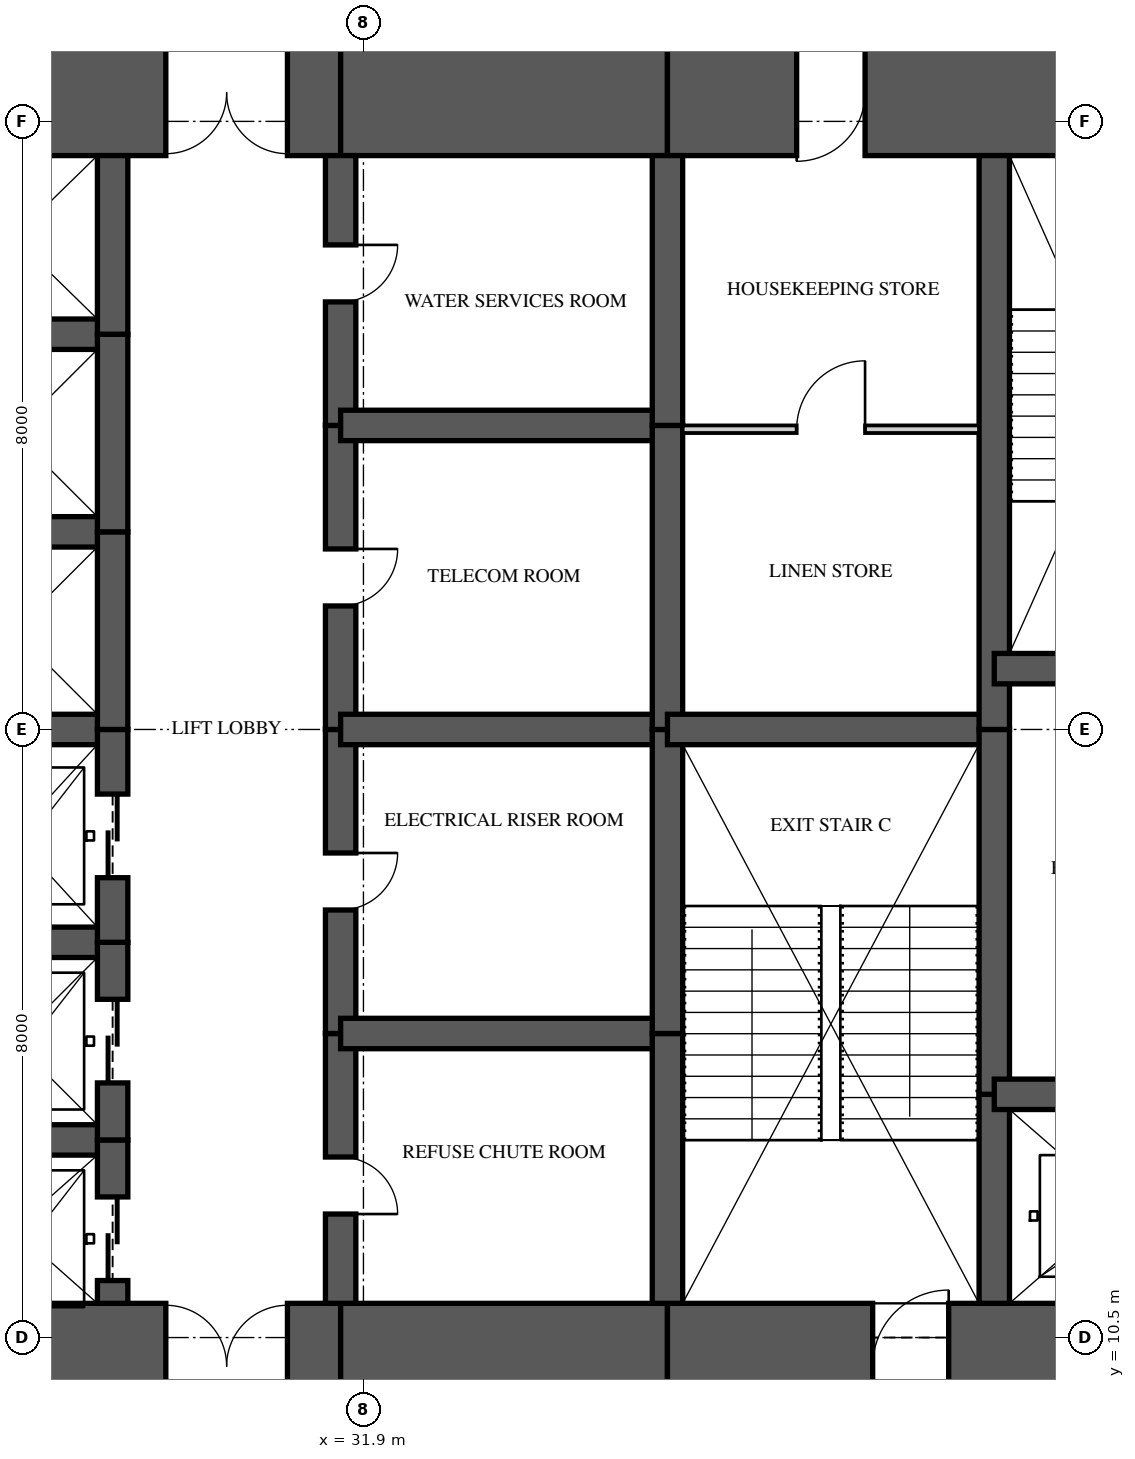
"""IFC4 building model, lengths in metres.
Left out: names, types, materials, properties, quantities, classifications, styles, units other than length and angle.
Written with IfcOpenShell. Run it as: python <this file> out.ifc"""

import sys

from ifc_helpers import new_model, si_unit, direction, frame, frame_2d, origin, place, context, subcontext, project, spatial, rectangle, extrude, element, fill, save


model = new_model("IFC4")
c1 = context("Model", 3, precision=1e-05, world=origin(), true_north=direction((0.0, 1.0)))
c2 = subcontext(c1, "Body", "Model", "MODEL_VIEW")
j1 = project(units=[si_unit("LENGTHUNIT", "METRE"), si_unit("PLANEANGLEUNIT", "RADIAN")], contexts=[c1])
p1 = place(None, origin())
s1 = spatial("IfcSite", under=j1, at=p1, CompositionType="ELEMENT")
p2 = place(p1, origin())
s2 = spatial("IfcBuilding", under=s1, at=p2, CompositionType="ELEMENT")
p3 = place(p2, frame((0.0, 0.0, 57.85)))
s3 = spatial("IfcBuildingStorey", under=s2, at=p3, CompositionType="ELEMENT", Elevation=57.85)
p4 = place(p3, frame((26.0, 10.125, 0.0), z_axis=(0.0, 0.0, 1.0), x_axis=(1.0, 0.0, 0.0)))
e1 = element("IfcWall", 1, at=p4, inside=s3, PredefinedType="SHEAR", context=c2, shape_type="SweptSolid", body=[
    extrude(rectangle(XDim=5.6, YDim=1.65, at=frame_2d((2.8, 0.0))), origin(), (0.0, 0.0, 1.0), 3.35),
])
p5 = place(p4, frame((3.3, 0.0, 0.0)))
e2 = element("IfcOpeningElement", 2, at=p5, cuts=e1, PredefinedType="OPENING", context=c2, shape_type="SweptSolid", body=[
    extrude(rectangle(XDim=1.6, YDim=2.1, at=frame_2d((0.8, 1.05))), frame((0.0, 0.835, 0.0), z_axis=(0.0, -1.0, 0.0), x_axis=(1.0, 0.0, 0.0)), (0.0, 0.0, 1.0), 1.67),
])
p6 = place(p3, frame((31.6, 10.125, 0.0), z_axis=(0.0, 0.0, 1.0), x_axis=(1.0, 0.0, 0.0)))
e3 = element("IfcWall", 3, at=p6, inside=s3, PredefinedType="SHEAR", context=c2, shape_type="SweptSolid", body=[
    extrude(rectangle(XDim=4.3, YDim=1.65, at=frame_2d((2.15, 0.0))), origin(), (0.0, 0.0, 1.0), 3.35),
])
p7 = place(p3, frame((35.9, 10.125, 0.0), z_axis=(0.0, 0.0, 1.0), x_axis=(1.0, 0.0, 0.0)))
e4 = element("IfcWall", 4, at=p7, inside=s3, PredefinedType="SHEAR", context=c2, shape_type="SweptSolid", body=[
    extrude(rectangle(XDim=8.375, YDim=1.65, at=frame_2d((4.188, 0.0))), origin(), (0.0, 0.0, 1.0), 3.35),
])
p8 = place(p7, frame((2.7, 0.0, 0.0)))
e5 = element("IfcOpeningElement", 5, at=p8, cuts=e4, PredefinedType="OPENING", context=c2, shape_type="SweptSolid", body=[
    extrude(rectangle(XDim=1.0, YDim=2.1, at=frame_2d((0.5, 1.05))), frame((0.0, 0.835, 0.0), z_axis=(0.0, -1.0, 0.0), x_axis=(1.0, 0.0, 0.0)), (0.0, 0.0, 1.0), 1.67),
])
p9 = place(p3, frame((44.275, 26.875, 0.0), z_axis=(0.0, 0.0, 1.0), x_axis=(-1.0, 0.0, 0.0)))
e6 = element("IfcWall", 6, at=p9, inside=s3, PredefinedType="SHEAR", context=c2, shape_type="SweptSolid", body=[
    extrude(rectangle(XDim=8.375, YDim=1.65, at=frame_2d((4.188, 0.0))), origin(), (0.0, 0.0, 1.0), 3.35),
])
p10 = place(p9, frame((5.775, 0.0, 0.0)))
e7 = element("IfcOpeningElement", 7, at=p10, cuts=e6, PredefinedType="OPENING", context=c2, shape_type="SweptSolid", body=[
    extrude(rectangle(XDim=0.9, YDim=2.1, at=frame_2d((0.45, 1.05))), frame((0.0, 0.835, 0.0), z_axis=(0.0, -1.0, 0.0), x_axis=(1.0, 0.0, 0.0)), (0.0, 0.0, 1.0), 1.67),
])
p11 = place(p3, frame((35.9, 26.875, 0.0), z_axis=(0.0, 0.0, 1.0), x_axis=(-1.0, 0.0, 0.0)))
e8 = element("IfcWall", 8, at=p11, inside=s3, PredefinedType="SHEAR", context=c2, shape_type="SweptSolid", body=[
    extrude(rectangle(XDim=4.3, YDim=1.65, at=frame_2d((2.15, 0.0))), origin(), (0.0, 0.0, 1.0), 3.35),
])
p12 = place(p3, frame((31.6, 26.875, 0.0), z_axis=(0.0, 0.0, 1.0), x_axis=(-1.0, 0.0, 0.0)))
e9 = element("IfcWall", 9, at=p12, inside=s3, PredefinedType="SHEAR", context=c2, shape_type="SweptSolid", body=[
    extrude(rectangle(XDim=5.6, YDim=1.65, at=frame_2d((2.8, 0.0))), origin(), (0.0, 0.0, 1.0), 3.35),
])
p13 = place(p12, frame((0.7, 0.0, 0.0)))
e10 = element("IfcOpeningElement", 10, at=p13, cuts=e9, PredefinedType="OPENING", context=c2, shape_type="SweptSolid", body=[
    extrude(rectangle(XDim=1.6, YDim=2.1, at=frame_2d((0.8, 1.05))), frame((0.0, 0.835, 0.0), z_axis=(0.0, -1.0, 0.0), x_axis=(1.0, 0.0, 0.0)), (0.0, 0.0, 1.0), 1.67),
])
p14 = place(p3, frame((28.6, 10.95, 0.0), z_axis=(0.0, 0.0, 1.0), x_axis=(0.0, 1.0, 0.0)))
e11 = element("IfcWall", 11, at=p14, inside=s3, PredefinedType="SHEAR", context=c2, shape_type="SweptSolid", body=[
    extrude(rectangle(XDim=2.15, YDim=0.4, at=frame_2d((1.075, 0.0))), origin(), (0.0, 0.0, 1.0), 3.35),
])
p15 = place(p14, frame((0.3, 0.0, 0.0)))
e12 = element("IfcOpeningElement", 12, at=p15, cuts=e11, PredefinedType="OPENING", context=c2, shape_type="SweptSolid", body=[
    extrude(rectangle(XDim=1.1, YDim=2.1, at=frame_2d((0.55, 1.05))), frame((0.0, 0.21, 0.0), z_axis=(0.0, -1.0, 0.0), x_axis=(1.0, 0.0, 0.0)), (0.0, 0.0, 1.0), 0.42),
])
p16 = place(p3, frame((28.6, 13.1, 0.0), z_axis=(0.0, 0.0, 1.0), x_axis=(0.0, 1.0, 0.0)))
e13 = element("IfcWall", 13, at=p16, inside=s3, PredefinedType="SHEAR", context=c2, shape_type="SweptSolid", body=[
    extrude(rectangle(XDim=2.6, YDim=0.4, at=frame_2d((1.3, 0.0))), origin(), (0.0, 0.0, 1.0), 3.35),
])
p17 = place(p16, frame((0.75, 0.0, 0.0)))
e14 = element("IfcOpeningElement", 14, at=p17, cuts=e13, PredefinedType="OPENING", context=c2, shape_type="SweptSolid", body=[
    extrude(rectangle(XDim=1.1, YDim=2.1, at=frame_2d((0.55, 1.05))), frame((0.0, 0.21, 0.0), z_axis=(0.0, -1.0, 0.0), x_axis=(1.0, 0.0, 0.0)), (0.0, 0.0, 1.0), 0.42),
])
p18 = place(p3, frame((28.6, 15.7, 0.0), z_axis=(0.0, 0.0, 1.0), x_axis=(0.0, 1.0, 0.0)))
e15 = element("IfcWall", 15, at=p18, inside=s3, PredefinedType="SHEAR", context=c2, shape_type="SweptSolid", body=[
    extrude(rectangle(XDim=2.8, YDim=0.4, at=frame_2d((1.4, 0.0))), origin(), (0.0, 0.0, 1.0), 3.35),
])
p19 = place(p18, frame((0.85, 0.0, 0.0)))
e16 = element("IfcOpeningElement", 16, at=p19, cuts=e15, PredefinedType="OPENING", context=c2, shape_type="SweptSolid", body=[
    extrude(rectangle(XDim=1.1, YDim=2.1, at=frame_2d((0.55, 1.05))), frame((0.0, 0.21, 0.0), z_axis=(0.0, -1.0, 0.0), x_axis=(1.0, 0.0, 0.0)), (0.0, 0.0, 1.0), 0.42),
])
p20 = place(p3, frame((28.6, 18.5, 0.0), z_axis=(0.0, 0.0, 1.0), x_axis=(0.0, 1.0, 0.0)))
e17 = element("IfcWall", 17, at=p20, inside=s3, PredefinedType="SHEAR", context=c2, shape_type="SweptSolid", body=[
    extrude(rectangle(XDim=2.6, YDim=0.4, at=frame_2d((1.3, 0.0))), origin(), (0.0, 0.0, 1.0), 3.35),
])
p21 = place(p3, frame((28.6, 21.1, 0.0), z_axis=(0.0, 0.0, 1.0), x_axis=(0.0, 1.0, 0.0)))
e18 = element("IfcWall", 18, at=p21, inside=s3, PredefinedType="SHEAR", context=c2, shape_type="SweptSolid", body=[
    extrude(rectangle(XDim=2.6, YDim=0.4, at=frame_2d((1.3, 0.0))), origin(), (0.0, 0.0, 1.0), 3.35),
])
p22 = place(p3, frame((28.6, 23.7, 0.0), z_axis=(0.0, 0.0, 1.0), x_axis=(0.0, 1.0, 0.0)))
e19 = element("IfcWall", 19, at=p22, inside=s3, PredefinedType="SHEAR", context=c2, shape_type="SweptSolid", body=[
    extrude(rectangle(XDim=2.35, YDim=0.4, at=frame_2d((1.175, 0.0))), origin(), (0.0, 0.0, 1.0), 3.35),
])
p23 = place(p3, frame((31.6, 10.95, 0.0), z_axis=(0.0, 0.0, 1.0), x_axis=(0.0, 1.0, 0.0)))
e20 = element("IfcWall", 20, at=p23, inside=s3, PredefinedType="SHEAR", context=c2, shape_type="SweptSolid", body=[
    extrude(rectangle(XDim=3.55, YDim=0.4, at=frame_2d((1.775, 0.0))), origin(), (0.0, 0.0, 1.0), 3.35),
])
p24 = place(p23, frame((1.175, 0.0, 0.0)))
e21 = element("IfcOpeningElement", 21, at=p24, cuts=e20, PredefinedType="OPENING", context=c2, shape_type="SweptSolid", body=[
    extrude(rectangle(XDim=0.75, YDim=2.1, at=frame_2d((0.375, 1.05))), frame((0.0, 0.21, 0.0), z_axis=(0.0, -1.0, 0.0), x_axis=(1.0, 0.0, 0.0)), (0.0, 0.0, 1.0), 0.42),
])
p25 = place(p3, frame((31.6, 14.5, 0.0), z_axis=(0.0, 0.0, 1.0), x_axis=(0.0, 1.0, 0.0)))
e22 = element("IfcWall", 22, at=p25, inside=s3, PredefinedType="SHEAR", context=c2, shape_type="SweptSolid", body=[
    extrude(rectangle(XDim=4.0, YDim=0.4, at=frame_2d((2.0, 0.0))), origin(), (0.0, 0.0, 1.0), 3.35),
])
p26 = place(p25, frame((1.625, 0.0, 0.0)))
e23 = element("IfcOpeningElement", 23, at=p26, cuts=e22, PredefinedType="OPENING", context=c2, shape_type="SweptSolid", body=[
    extrude(rectangle(XDim=0.75, YDim=2.1, at=frame_2d((0.375, 1.05))), frame((0.0, 0.21, 0.0), z_axis=(0.0, -1.0, 0.0), x_axis=(1.0, 0.0, 0.0)), (0.0, 0.0, 1.0), 0.42),
])
p27 = place(p3, frame((31.6, 18.5, 0.0), z_axis=(0.0, 0.0, 1.0), x_axis=(0.0, 1.0, 0.0)))
e24 = element("IfcWall", 24, at=p27, inside=s3, PredefinedType="SHEAR", context=c2, shape_type="SweptSolid", body=[
    extrude(rectangle(XDim=4.0, YDim=0.4, at=frame_2d((2.0, 0.0))), origin(), (0.0, 0.0, 1.0), 3.35),
])
p28 = place(p27, frame((1.625, 0.0, 0.0)))
e25 = element("IfcOpeningElement", 25, at=p28, cuts=e24, PredefinedType="OPENING", context=c2, shape_type="SweptSolid", body=[
    extrude(rectangle(XDim=0.75, YDim=2.1, at=frame_2d((0.375, 1.05))), frame((0.0, 0.21, 0.0), z_axis=(0.0, -1.0, 0.0), x_axis=(1.0, 0.0, 0.0)), (0.0, 0.0, 1.0), 0.42),
])
p29 = place(p3, frame((31.6, 22.5, 0.0), z_axis=(0.0, 0.0, 1.0), x_axis=(0.0, 1.0, 0.0)))
e26 = element("IfcWall", 26, at=p29, inside=s3, PredefinedType="SHEAR", context=c2, shape_type="SweptSolid", body=[
    extrude(rectangle(XDim=3.55, YDim=0.4, at=frame_2d((1.775, 0.0))), origin(), (0.0, 0.0, 1.0), 3.35),
])
p30 = place(p29, frame((1.625, 0.0, 0.0)))
e27 = element("IfcOpeningElement", 27, at=p30, cuts=e26, PredefinedType="OPENING", context=c2, shape_type="SweptSolid", body=[
    extrude(rectangle(XDim=0.75, YDim=2.1, at=frame_2d((0.375, 1.05))), frame((0.0, 0.21, 0.0), z_axis=(0.0, -1.0, 0.0), x_axis=(1.0, 0.0, 0.0)), (0.0, 0.0, 1.0), 0.42),
])
p31 = place(p3, frame((35.9, 10.95, 0.0), z_axis=(0.0, 0.0, 1.0), x_axis=(0.0, 1.0, 0.0)))
e28 = element("IfcWall", 28, at=p31, inside=s3, PredefinedType="SHEAR", context=c2, shape_type="SweptSolid", body=[
    extrude(rectangle(XDim=3.55, YDim=0.4, at=frame_2d((1.775, 0.0))), origin(), (0.0, 0.0, 1.0), 3.35),
])
for number, where, z_axis, x_axis in (
    (29, (35.9, 14.5, 0.0), (0.0, 0.0, 1.0), (0.0, 1.0, 0.0)),
    (30, (35.9, 18.5, 0.0), (0.0, 0.0, 1.0), (0.0, 1.0, 0.0)),
):
    element("IfcWall", number, at=place(p3, frame(where, z_axis=z_axis, x_axis=x_axis)), inside=s3, PredefinedType="SHEAR", context=c2, shape_type="SweptSolid", body=[
        extrude(rectangle(XDim=4.0, YDim=0.4, at=frame_2d((2.0, 0.0))), origin(), (0.0, 0.0, 1.0), 3.35),
    ])
p32 = place(p3, frame((35.9, 22.5, 0.0), z_axis=(0.0, 0.0, 1.0), x_axis=(0.0, 1.0, 0.0)))
e31 = element("IfcWall", 31, at=p32, inside=s3, PredefinedType="SHEAR", context=c2, shape_type="SweptSolid", body=[
    extrude(rectangle(XDim=3.55, YDim=0.4, at=frame_2d((1.775, 0.0))), origin(), (0.0, 0.0, 1.0), 3.35),
])
p33 = place(p3, frame((40.2, 10.95, 0.0), z_axis=(0.0, 0.0, 1.0), x_axis=(0.0, 1.0, 0.0)))
e32 = element("IfcWall", 32, at=p33, inside=s3, PredefinedType="SHEAR", context=c2, shape_type="SweptSolid", body=[
    extrude(rectangle(XDim=2.75, YDim=0.4, at=frame_2d((1.375, 0.0))), origin(), (0.0, 0.0, 1.0), 3.35),
])
p34 = place(p3, frame((40.2, 13.7, 0.0), z_axis=(0.0, 0.0, 1.0), x_axis=(0.0, 1.0, 0.0)))
e33 = element("IfcWall", 33, at=p34, inside=s3, PredefinedType="SHEAR", context=c2, shape_type="SweptSolid", body=[
    extrude(rectangle(XDim=4.8, YDim=0.4, at=frame_2d((2.4, 0.0))), origin(), (0.0, 0.0, 1.0), 3.35),
])
p35 = place(p3, frame((40.2, 18.5, 0.0), z_axis=(0.0, 0.0, 1.0), x_axis=(0.0, 1.0, 0.0)))
e34 = element("IfcWall", 34, at=p35, inside=s3, PredefinedType="SHEAR", context=c2, shape_type="SweptSolid", body=[
    extrude(rectangle(XDim=7.55, YDim=0.4, at=frame_2d((3.775, 0.0))), origin(), (0.0, 0.0, 1.0), 3.35),
])
for number, where, z_axis, x_axis in (
    (35, (26.0, 13.1, 0.0), (0.0, 0.0, 1.0), (1.0, 0.0, 0.0)),
    (36, (26.0, 15.7, 0.0), (0.0, 0.0, 1.0), (1.0, 0.0, 0.0)),
    (37, (26.0, 18.5, 0.0), (0.0, 0.0, 1.0), (1.0, 0.0, 0.0)),
    (38, (26.0, 21.1, 0.0), (0.0, 0.0, 1.0), (1.0, 0.0, 0.0)),
    (39, (26.0, 23.7, 0.0), (0.0, 0.0, 1.0), (1.0, 0.0, 0.0)),
):
    element("IfcWall", number, at=place(p3, frame(where, z_axis=z_axis, x_axis=x_axis)), inside=s3, PredefinedType="SHEAR", context=c2, shape_type="SweptSolid", body=[
        extrude(rectangle(XDim=2.6, YDim=0.4, at=frame_2d((1.3, 0.0))), origin(), (0.0, 0.0, 1.0), 3.35),
    ])
for number, where, z_axis, x_axis in (
    (40, (31.6, 14.5, 0.0), (0.0, 0.0, 1.0), (1.0, 0.0, 0.0)),
    (41, (31.6, 18.5, 0.0), (0.0, 0.0, 1.0), (1.0, 0.0, 0.0)),
    (42, (31.6, 22.5, 0.0), (0.0, 0.0, 1.0), (1.0, 0.0, 0.0)),
):
    element("IfcWall", number, at=place(p3, frame(where, z_axis=z_axis, x_axis=x_axis)), inside=s3, PredefinedType="SHEAR", context=c2, shape_type="SweptSolid", body=[
        extrude(rectangle(XDim=4.3, YDim=0.4, at=frame_2d((2.15, 0.0))), origin(), (0.0, 0.0, 1.0), 3.35),
    ])
p36 = place(p3, frame((35.9, 18.5, 0.0), z_axis=(0.0, 0.0, 1.0), x_axis=(1.0, 0.0, 0.0)))
e43 = element("IfcWall", 43, at=p36, inside=s3, PredefinedType="SHEAR", context=c2, shape_type="SweptSolid", body=[
    extrude(rectangle(XDim=4.3, YDim=0.4, at=frame_2d((2.15, 0.0))), origin(), (0.0, 0.0, 1.0), 3.35),
])
p37 = place(p3, frame((40.2, 13.7, 0.0), z_axis=(0.0, 0.0, 1.0), x_axis=(1.0, 0.0, 0.0)))
e44 = element("IfcWall", 44, at=p37, inside=s3, PredefinedType="SHEAR", context=c2, shape_type="SweptSolid", body=[
    extrude(rectangle(XDim=3.6, YDim=0.4, at=frame_2d((1.8, 0.0))), origin(), (0.0, 0.0, 1.0), 3.35),
])
p38 = place(p37, frame((1.2, 0.0, 0.0)))
e45 = element("IfcOpeningElement", 45, at=p38, cuts=e44, PredefinedType="OPENING", context=c2, shape_type="SweptSolid", body=[
    extrude(rectangle(XDim=1.2, YDim=2.1, at=frame_2d((0.6, 1.05))), frame((0.0, 0.21, 0.0), z_axis=(0.0, -1.0, 0.0), x_axis=(1.0, 0.0, 0.0)), (0.0, 0.0, 1.0), 0.42),
])
p39 = place(p3, frame((40.2, 19.3, 0.0), z_axis=(0.0, 0.0, 1.0), x_axis=(1.0, 0.0, 0.0)))
e46 = element("IfcWall", 46, at=p39, inside=s3, PredefinedType="SHEAR", context=c2, shape_type="SweptSolid", body=[
    extrude(rectangle(XDim=3.6, YDim=0.4, at=frame_2d((1.8, 0.0))), origin(), (0.0, 0.0, 1.0), 3.35),
])
p40 = place(p39, frame((1.3, 0.0, 0.0)))
e47 = element("IfcOpeningElement", 47, at=p40, cuts=e46, PredefinedType="OPENING", context=c2, shape_type="SweptSolid", body=[
    extrude(rectangle(XDim=1.0, YDim=2.1, at=frame_2d((0.5, 1.05))), frame((0.0, 0.21, 0.0), z_axis=(0.0, -1.0, 0.0), x_axis=(1.0, 0.0, 0.0)), (0.0, 0.0, 1.0), 0.42),
])
p41 = place(p3, frame((36.1, 22.45, 0.0), z_axis=(0.0, 0.0, 1.0), x_axis=(1.0, 0.0, 0.0)))
e48 = element("IfcWall", 48, at=p41, inside=s3, PredefinedType="PARTITIONING", context=c2, shape_type="SweptSolid", body=[
    extrude(rectangle(XDim=3.9, YDim=0.1, at=frame_2d((1.95, 0.0))), origin(), (0.0, 0.0, 1.0), 3.11),
])
p42 = place(p41, frame((1.5, 0.0, 0.0)))
e49 = element("IfcOpeningElement", 49, at=p42, cuts=e48, PredefinedType="OPENING", context=c2, shape_type="SweptSolid", body=[
    extrude(rectangle(XDim=0.9, YDim=2.1, at=frame_2d((0.45, 1.05))), frame((0.0, 0.06, 0.0), z_axis=(0.0, -1.0, 0.0), x_axis=(1.0, 0.0, 0.0)), (0.0, 0.0, 1.0), 0.12),
])
p43 = place(p42, origin())
e50 = element("IfcDoor", 50, at=p43, inside=s3, OperationType="SINGLE_SWING_RIGHT", PredefinedType="DOOR", context=c2, shape_type="SweptSolid", body=[
    extrude(rectangle(XDim=0.9, YDim=2.1, at=frame_2d((0.45, 1.05))), frame((0.0, 0.025, 0.0), z_axis=(0.0, -1.0, 0.0), x_axis=(1.0, 0.0, 0.0)), (0.0, 0.0, 1.0), 0.05),
])
fill(e49, e50)
p44 = place(p15, origin())
e51 = element("IfcDoor", 51, at=p44, inside=s3, OperationType="SLIDING_TO_LEFT", PredefinedType="DOOR", context=c2, shape_type="SweptSolid", body=[
    extrude(rectangle(XDim=1.1, YDim=2.1, at=frame_2d((0.55, 1.05))), frame((0.0, 0.025, 0.0), z_axis=(0.0, -1.0, 0.0), x_axis=(1.0, 0.0, 0.0)), (0.0, 0.0, 1.0), 0.05),
])
fill(e12, e51)
p45 = place(p17, origin())
e52 = element("IfcDoor", 52, at=p45, inside=s3, OperationType="SLIDING_TO_LEFT", PredefinedType="DOOR", context=c2, shape_type="SweptSolid", body=[
    extrude(rectangle(XDim=1.1, YDim=2.1, at=frame_2d((0.55, 1.05))), frame((0.0, 0.025, 0.0), z_axis=(0.0, -1.0, 0.0), x_axis=(1.0, 0.0, 0.0)), (0.0, 0.0, 1.0), 0.05),
])
fill(e14, e52)
p46 = place(p19, origin())
e53 = element("IfcDoor", 53, at=p46, inside=s3, OperationType="SLIDING_TO_LEFT", PredefinedType="DOOR", context=c2, shape_type="SweptSolid", body=[
    extrude(rectangle(XDim=1.1, YDim=2.1, at=frame_2d((0.55, 1.05))), frame((0.0, 0.025, 0.0), z_axis=(0.0, -1.0, 0.0), x_axis=(1.0, 0.0, 0.0)), (0.0, 0.0, 1.0), 0.05),
])
fill(e16, e53)
p47 = place(p5, origin())
e54 = element("IfcDoor", 54, at=p47, inside=s3, OperationType="DOUBLE_DOOR_SINGLE_SWING", PredefinedType="DOOR", context=c2, shape_type="SweptSolid", body=[
    extrude(rectangle(XDim=1.6, YDim=2.1, at=frame_2d((0.8, 1.05))), frame((0.0, 0.025, 0.0), z_axis=(0.0, -1.0, 0.0), x_axis=(1.0, 0.0, 0.0)), (0.0, 0.0, 1.0), 0.05),
])
fill(e2, e54)
p48 = place(p13, origin())
e55 = element("IfcDoor", 55, at=p48, inside=s3, OperationType="DOUBLE_DOOR_SINGLE_SWING", PredefinedType="DOOR", context=c2, shape_type="SweptSolid", body=[
    extrude(rectangle(XDim=1.6, YDim=2.1, at=frame_2d((0.8, 1.05))), frame((0.0, 0.025, 0.0), z_axis=(0.0, -1.0, 0.0), x_axis=(1.0, 0.0, 0.0)), (0.0, 0.0, 1.0), 0.05),
])
fill(e10, e55)
p49 = place(p24, frame((0.75, 0.0, 0.0), z_axis=(0.0, 0.0, 1.0), x_axis=(-1.0, 0.0, 0.0)))
e56 = element("IfcDoor", 56, at=p49, inside=s3, OperationType="SINGLE_SWING_RIGHT", PredefinedType="DOOR", context=c2, shape_type="SweptSolid", body=[
    extrude(rectangle(XDim=0.75, YDim=2.1, at=frame_2d((0.375, 1.05))), frame((0.0, 0.025, 0.0), z_axis=(0.0, -1.0, 0.0), x_axis=(1.0, 0.0, 0.0)), (0.0, 0.0, 1.0), 0.05),
])
fill(e21, e56)
p50 = place(p26, frame((0.75, 0.0, 0.0), z_axis=(0.0, 0.0, 1.0), x_axis=(-1.0, 0.0, 0.0)))
e57 = element("IfcDoor", 57, at=p50, inside=s3, OperationType="SINGLE_SWING_LEFT", PredefinedType="DOOR", context=c2, shape_type="SweptSolid", body=[
    extrude(rectangle(XDim=0.75, YDim=2.1, at=frame_2d((0.375, 1.05))), frame((0.0, 0.025, 0.0), z_axis=(0.0, -1.0, 0.0), x_axis=(1.0, 0.0, 0.0)), (0.0, 0.0, 1.0), 0.05),
])
fill(e23, e57)
p51 = place(p28, frame((0.75, 0.0, 0.0), z_axis=(0.0, 0.0, 1.0), x_axis=(-1.0, 0.0, 0.0)))
e58 = element("IfcDoor", 58, at=p51, inside=s3, OperationType="SINGLE_SWING_LEFT", PredefinedType="DOOR", context=c2, shape_type="SweptSolid", body=[
    extrude(rectangle(XDim=0.75, YDim=2.1, at=frame_2d((0.375, 1.05))), frame((0.0, 0.025, 0.0), z_axis=(0.0, -1.0, 0.0), x_axis=(1.0, 0.0, 0.0)), (0.0, 0.0, 1.0), 0.05),
])
fill(e25, e58)
p52 = place(p30, frame((0.75, 0.0, 0.0), z_axis=(0.0, 0.0, 1.0), x_axis=(-1.0, 0.0, 0.0)))
e59 = element("IfcDoor", 59, at=p52, inside=s3, OperationType="SINGLE_SWING_LEFT", PredefinedType="DOOR", context=c2, shape_type="SweptSolid", body=[
    extrude(rectangle(XDim=0.75, YDim=2.1, at=frame_2d((0.375, 1.05))), frame((0.0, 0.025, 0.0), z_axis=(0.0, -1.0, 0.0), x_axis=(1.0, 0.0, 0.0)), (0.0, 0.0, 1.0), 0.05),
])
fill(e27, e59)
p53 = place(p8, origin())
e60 = element("IfcDoor", 60, at=p53, inside=s3, OperationType="SINGLE_SWING_RIGHT", PredefinedType="DOOR", context=c2, shape_type="SweptSolid", body=[
    extrude(rectangle(XDim=1.0, YDim=2.1, at=frame_2d((0.5, 1.05))), frame((0.0, 0.025, 0.0), z_axis=(0.0, -1.0, 0.0), x_axis=(1.0, 0.0, 0.0)), (0.0, 0.0, 1.0), 0.05),
])
fill(e5, e60)
p54 = place(p10, origin())
e61 = element("IfcDoor", 61, at=p54, inside=s3, OperationType="SINGLE_SWING_RIGHT", PredefinedType="DOOR", context=c2, shape_type="SweptSolid", body=[
    extrude(rectangle(XDim=0.9, YDim=2.1, at=frame_2d((0.45, 1.05))), frame((0.0, 0.47, 0.0), z_axis=(0.0, -1.0, 0.0), x_axis=(1.0, 0.0, 0.0)), (0.0, 0.0, 1.0), 0.8),
])
fill(e7, e61)
save(model, sys.argv[1])
